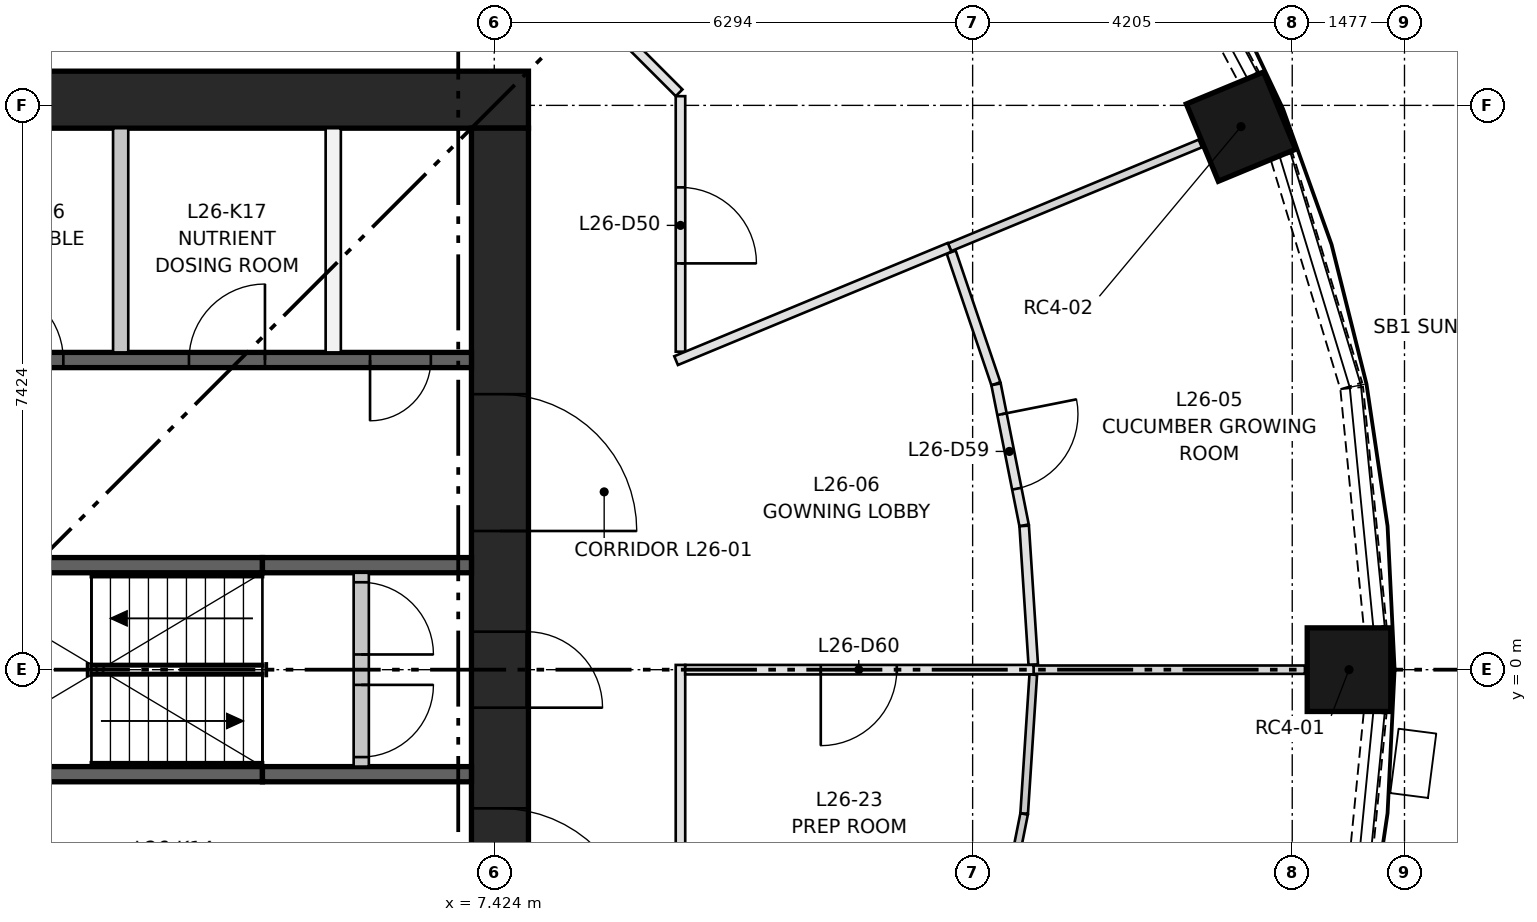
"""IFC4 building model, lengths in metres.
Left out: names, types, materials, properties, quantities, classifications, styles, units other than length and angle.
Written with IfcOpenShell. Run it as: python <this file> out.ifc"""

import sys

from ifc_helpers import new_model, si_unit, direction, frame, frame_2d, origin, origin_2d, place, context, subcontext, project, spatial, rectangle, extrude, element, fill, save


model = new_model("IFC4")
c1 = context("Model", 3, precision=1e-05, world=origin(), true_north=direction((0.0, 1.0)))
c2 = subcontext(c1, "Body", "Model", "MODEL_VIEW")
j1 = project(units=[si_unit("LENGTHUNIT", "METRE"), si_unit("PLANEANGLEUNIT", "RADIAN")], contexts=[c1])
p1 = place(None, origin())
s1 = spatial("IfcSite", under=j1, at=p1, CompositionType="ELEMENT")
p2 = place(p1, origin())
s2 = spatial("IfcBuilding", under=s1, at=p2, CompositionType="ELEMENT")
p3 = place(p2, frame((0.0, 0.0, 101.95)))
s3 = spatial("IfcBuildingStorey", under=s2, at=p3, CompositionType="ELEMENT", Elevation=101.95)
for number, where, z_axis, x_axis in (
    (1, (18.67, 0.0, 0.0), (0.0, 0.0, 1.0), (1.0, 0.0, 0.0)),
    (2, (17.249, 7.145, 0.0), (0.0, 0.0, 1.0), (0.924, 0.383, 0.0)),
):
    element("IfcColumn", number, at=place(p3, frame(where, z_axis=z_axis, x_axis=x_axis)), inside=s3, PredefinedType="COLUMN", context=c2, shape_type="SweptSolid", body=[
        extrude(rectangle(XDim=1.1, YDim=1.1, at=origin_2d()), origin(), (0.0, 0.0, 1.0), 3.65),
    ])
p4 = place(p3, frame((-7.874, 7.499, 0.0), z_axis=(0.0, 0.0, 1.0), x_axis=(1.0, 0.0, 0.0)))
e3 = element("IfcWall", 3, at=p4, inside=s3, PredefinedType="SHEAR", context=c2, shape_type="SweptSolid", body=[
    extrude(rectangle(XDim=15.748, YDim=0.75, at=frame_2d((7.874, 0.0))), origin(), (0.0, 0.0, 1.0), 3.65),
])
p5 = place(p3, frame((7.499, -7.124, 0.0), z_axis=(0.0, 0.0, 1.0), x_axis=(0.0, 1.0, 0.0)))
e4 = element("IfcWall", 4, at=p5, inside=s3, PredefinedType="SHEAR", context=c2, shape_type="SweptSolid", body=[
    extrude(rectangle(XDim=14.248, YDim=0.75, at=frame_2d((7.124, 0.0))), origin(), (0.0, 0.0, 1.0), 3.65),
])
p6 = place(p5, frame((6.624, 0.0, 0.0)))
e5 = element("IfcOpeningElement", 5, at=p6, cuts=e4, PredefinedType="OPENING", context=c2, shape_type="SweptSolid", body=[
    extrude(rectangle(XDim=1.0, YDim=2.1, at=frame_2d((0.5, 1.05))), frame((0.0, 0.385, 0.0), z_axis=(0.0, -1.0, 0.0), x_axis=(1.0, 0.0, 0.0)), (0.0, 0.0, 1.0), 0.77),
])
p7 = place(p5, frame((3.5, 0.0, 0.0)))
e6 = element("IfcOpeningElement", 6, at=p7, cuts=e4, PredefinedType="OPENING", context=c2, shape_type="SweptSolid", body=[
    extrude(rectangle(XDim=1.8, YDim=2.1, at=frame_2d((0.9, 1.05))), frame((0.0, 0.385, 0.0), z_axis=(0.0, -1.0, 0.0), x_axis=(1.0, 0.0, 0.0)), (0.0, 0.0, 1.0), 0.77),
])
p8 = place(p5, frame((8.948, 0.0, 0.0)))
e7 = element("IfcOpeningElement", 7, at=p8, cuts=e4, PredefinedType="OPENING", context=c2, shape_type="SweptSolid", body=[
    extrude(rectangle(XDim=1.8, YDim=2.1, at=frame_2d((0.9, 1.05))), frame((0.0, 0.385, 0.0), z_axis=(0.0, -1.0, 0.0), x_axis=(1.0, 0.0, 0.0)), (0.0, 0.0, 1.0), 0.77),
])
p9 = place(p3, frame((0.0, 4.074, 0.0), z_axis=(0.0, 0.0, 1.0), x_axis=(1.0, 0.0, 0.0)))
e8 = element("IfcWall", 8, at=p9, inside=s3, PredefinedType="SHEAR", context=c2, shape_type="SweptSolid", body=[
    extrude(rectangle(XDim=7.124, YDim=0.2, at=frame_2d((3.562, 0.0))), origin(), (0.0, 0.0, 1.0), 3.3),
])
p10 = place(p9, frame((0.754, 0.0, 0.0)))
e9 = element("IfcOpeningElement", 9, at=p10, cuts=e8, PredefinedType="OPENING", context=c2, shape_type="SweptSolid", body=[
    extrude(rectangle(XDim=1.0, YDim=2.1, at=frame_2d((0.5, 1.05))), frame((0.0, 0.11, 0.0), z_axis=(0.0, -1.0, 0.0), x_axis=(1.0, 0.0, 0.0)), (0.0, 0.0, 1.0), 0.22),
])
p11 = place(p9, frame((3.407, 0.0, 0.0)))
e10 = element("IfcOpeningElement", 10, at=p11, cuts=e8, PredefinedType="OPENING", context=c2, shape_type="SweptSolid", body=[
    extrude(rectangle(XDim=1.0, YDim=2.1, at=frame_2d((0.5, 1.05))), frame((0.0, 0.11, 0.0), z_axis=(0.0, -1.0, 0.0), x_axis=(1.0, 0.0, 0.0)), (0.0, 0.0, 1.0), 0.22),
])
p12 = place(p9, frame((5.79, 0.0, 0.0)))
e11 = element("IfcOpeningElement", 11, at=p12, cuts=e8, PredefinedType="OPENING", context=c2, shape_type="SweptSolid", body=[
    extrude(rectangle(XDim=0.8, YDim=2.1, at=frame_2d((0.4, 1.05))), frame((0.0, 0.11, 0.0), z_axis=(0.0, -1.0, 0.0), x_axis=(1.0, 0.0, 0.0)), (0.0, 0.0, 1.0), 0.22),
])
p13 = place(p3, frame((0.0, -1.375, 0.0), z_axis=(0.0, 0.0, 1.0), x_axis=(1.0, 0.0, 0.0)))
e12 = element("IfcWall", 12, at=p13, inside=s3, PredefinedType="SHEAR", context=c2, shape_type="SweptSolid", body=[
    extrude(rectangle(XDim=4.374, YDim=0.2, at=frame_2d((2.187, 0.0))), origin(), (0.0, 0.0, 1.0), 3.3),
])
p14 = place(p3, frame((4.374, -1.375, 0.0), z_axis=(0.0, 0.0, 1.0), x_axis=(1.0, 0.0, 0.0)))
e13 = element("IfcWall", 13, at=p14, inside=s3, PredefinedType="SHEAR", context=c2, shape_type="SweptSolid", body=[
    extrude(rectangle(XDim=2.75, YDim=0.2, at=frame_2d((1.375, 0.0))), origin(), (0.0, 0.0, 1.0), 3.3),
])
p15 = place(p3, frame((0.0, 1.375, 0.0), z_axis=(0.0, 0.0, 1.0), x_axis=(1.0, 0.0, 0.0)))
e14 = element("IfcWall", 14, at=p15, inside=s3, PredefinedType="SHEAR", context=c2, shape_type="SweptSolid", body=[
    extrude(rectangle(XDim=4.374, YDim=0.2, at=frame_2d((2.187, 0.0))), origin(), (0.0, 0.0, 1.0), 3.3),
])
p16 = place(p3, frame((4.374, 1.375, 0.0), z_axis=(0.0, 0.0, 1.0), x_axis=(1.0, 0.0, 0.0)))
e15 = element("IfcWall", 15, at=p16, inside=s3, PredefinedType="SHEAR", context=c2, shape_type="SweptSolid", body=[
    extrude(rectangle(XDim=2.75, YDim=0.2, at=frame_2d((1.375, 0.0))), origin(), (0.0, 0.0, 1.0), 3.3),
])
for number, where, z_axis, x_axis in (
    (16, (2.509, 4.174, 0.0), (0.0, 0.0, 1.0), (0.0, 1.0, 0.0)),
    (17, (5.305, 4.174, 0.0), (0.0, 0.0, 1.0), (0.0, 1.0, 0.0)),
):
    element("IfcWall", number, at=place(p3, frame(where, z_axis=z_axis, x_axis=x_axis)), inside=s3, PredefinedType="PARTITIONING", context=c2, shape_type="SweptSolid", body=[
        extrude(rectangle(XDim=2.95, YDim=0.2, at=frame_2d((1.475, 0.0))), origin(), (0.0, 0.0, 1.0), 3.3),
    ])
p17 = place(p3, frame((5.674, -1.275, 0.0), z_axis=(0.0, 0.0, 1.0), x_axis=(0.0, 1.0, 0.0)))
e18 = element("IfcWall", 18, at=p17, inside=s3, PredefinedType="PARTITIONING", context=c2, shape_type="SweptSolid", body=[
    extrude(rectangle(XDim=2.55, YDim=0.2, at=frame_2d((1.275, 0.0))), origin(), (0.0, 0.0, 1.0), 3.3),
])
p18 = place(p17, frame((0.125, 0.0, 0.0)))
e19 = element("IfcOpeningElement", 19, at=p18, cuts=e18, PredefinedType="OPENING", context=c2, shape_type="SweptSolid", body=[
    extrude(rectangle(XDim=0.95, YDim=2.1, at=frame_2d((0.475, 1.05))), frame((0.0, 0.11, 0.0), z_axis=(0.0, -1.0, 0.0), x_axis=(1.0, 0.0, 0.0)), (0.0, 0.0, 1.0), 0.22),
])
p19 = place(p17, frame((1.475, 0.0, 0.0)))
e20 = element("IfcOpeningElement", 20, at=p19, cuts=e18, PredefinedType="OPENING", context=c2, shape_type="SweptSolid", body=[
    extrude(rectangle(XDim=0.95, YDim=2.1, at=frame_2d((0.475, 1.05))), frame((0.0, 0.11, 0.0), z_axis=(0.0, -1.0, 0.0), x_axis=(1.0, 0.0, 0.0)), (0.0, 0.0, 1.0), 0.22),
])
p20 = place(p3, frame((19.014, 0.564, 0.0), z_axis=(0.0, 0.0, 1.0), x_axis=(-0.097849336863, 0.995201239587, 0.0)))
e21 = element("IfcWall", 21, at=p20, inside=s3, PredefinedType="SOLIDWALL", context=c2, shape_type="SweptSolid", body=[
    extrude(rectangle(XDim=3.156, YDim=0.3, at=frame_2d((1.578, 0.0))), origin(), (0.0, 0.0, 1.0), 0.9),
])
p21 = place(p3, frame((18.7, 3.734, 0.0), z_axis=(0.0, 0.0, 1.0), x_axis=(-0.290503096001, 0.956874051907, 0.0)))
e22 = element("IfcWall", 22, at=p21, inside=s3, PredefinedType="SOLIDWALL", context=c2, shape_type="SweptSolid", body=[
    extrude(rectangle(XDim=3.157, YDim=0.3, at=frame_2d((1.579, 0.0))), origin(), (0.0, 0.0, 1.0), 0.9),
])
p22 = place(p3, frame((17.351, 7.797, 0.0), z_axis=(0.0, 0.0, 1.0), x_axis=(-0.471238306932, 0.882005928597, 0.0)))
e23 = element("IfcWall", 23, at=p22, inside=s3, PredefinedType="SOLIDWALL", context=c2, shape_type="SweptSolid", body=[
    extrude(rectangle(XDim=3.157, YDim=0.3, at=frame_2d((1.579, 0.0))), origin(), (0.0, 0.0, 1.0), 0.9),
])
p23 = place(p3, frame((18.706, -3.705, 0.0), z_axis=(0.0, 0.0, 1.0), x_axis=(0.097849336863, 0.995201239587, 0.0)))
e24 = element("IfcWall", 24, at=p23, inside=s3, PredefinedType="SOLIDWALL", context=c2, shape_type="SweptSolid", body=[
    extrude(rectangle(XDim=3.156, YDim=0.3, at=frame_2d((1.578, 0.0))), origin(), (0.0, 0.0, 1.0), 0.9),
])
p24 = place(p3, frame((8.722, 8.722, 0.0), z_axis=(0.0, 0.0, 1.0), x_axis=(0.70718294931, -0.707030604857, 0.0)))
e25 = element("IfcWall", 25, at=p24, inside=s3, PredefinedType="PARTITIONING", context=c2, shape_type="SweptSolid", body=[
    extrude(rectangle(XDim=1.603, YDim=0.125, at=frame_2d((0.801, 0.0))), origin(), (0.0, 0.0, 1.0), 3.3),
])
p25 = place(p3, frame((9.874, 7.545, 0.0), z_axis=(0.0, 0.0, 1.0), x_axis=(0.0, -1.0, 0.0)))
e26 = element("IfcWall", 26, at=p25, inside=s3, PredefinedType="PARTITIONING", context=c2, shape_type="SweptSolid", body=[
    extrude(rectangle(XDim=3.362, YDim=0.125, at=frame_2d((1.681, 0.0))), origin(), (0.0, 0.0, 1.0), 3.3),
])
p26 = place(p25, frame((1.2, 0.0, 0.0)))
e27 = element("IfcOpeningElement", 27, at=p26, cuts=e26, PredefinedType="OPENING", context=c2, shape_type="SweptSolid", body=[
    extrude(rectangle(XDim=1.0, YDim=2.1, at=frame_2d((0.5, 1.05))), frame((0.0, 0.073, 0.0), z_axis=(0.0, -1.0, 0.0), x_axis=(1.0, 0.0, 0.0)), (0.0, 0.0, 1.0), 0.145),
])
p27 = place(p3, frame((9.874, 0.062, 0.0), z_axis=(0.0, 0.0, 1.0), x_axis=(0.0, -1.0, 0.0)))
e28 = element("IfcWall", 28, at=p27, inside=s3, PredefinedType="PARTITIONING", context=c2, shape_type="SweptSolid", body=[
    extrude(rectangle(XDim=4.152, YDim=0.125, at=frame_2d((2.076, 0.0))), origin(), (0.0, 0.0, 1.0), 3.3),
])
p28 = place(p3, frame((14.024, 3.762, 0.0), z_axis=(0.0, 0.0, 1.0), x_axis=(-0.321390424162, 0.946946775303, 0.0)))
e29 = element("IfcWall", 29, at=p28, inside=s3, PredefinedType="PARTITIONING", context=c2, shape_type="SweptSolid", body=[
    extrude(rectangle(XDim=1.828, YDim=0.125, at=frame_2d((0.914, 0.0))), origin(), (0.0, 0.0, 1.0), 3.3),
])
p29 = place(p3, frame((14.026, 3.754, 0.0), z_axis=(0.0, 0.0, 1.0), x_axis=(0.195172749159, -0.980768881024, 0.0)))
e30 = element("IfcWall", 30, at=p29, inside=s3, PredefinedType="PARTITIONING", context=c2, shape_type="SweptSolid", body=[
    extrude(rectangle(XDim=1.891, YDim=0.125, at=frame_2d((0.946, 0.0))), origin(), (0.0, 0.0, 1.0), 3.3),
])
p30 = place(p29, frame((0.4, 0.0, 0.0)))
e31 = element("IfcOpeningElement", 31, at=p30, cuts=e30, PredefinedType="OPENING", context=c2, shape_type="SweptSolid", body=[
    extrude(rectangle(XDim=1.0, YDim=2.1, at=frame_2d((0.5, 1.05))), frame((0.0, 0.073, 0.0), z_axis=(0.0, -1.0, 0.0), x_axis=(1.0, 0.0, 0.0)), (0.0, 0.0, 1.0), 0.145),
])
p31 = place(p3, frame((14.516, 0.067, 0.0), z_axis=(0.0, 0.0, 1.0), x_axis=(-0.065428883326, 0.997857234892, 0.0)))
e32 = element("IfcWall", 32, at=p31, inside=s3, PredefinedType="PARTITIONING", context=c2, shape_type="SweptSolid", body=[
    extrude(rectangle(XDim=1.828, YDim=0.125, at=frame_2d((0.914, 0.0))), origin(), (0.0, 0.0, 1.0), 3.3),
])
p32 = place(p3, frame((13.415, 5.556, 0.0), z_axis=(0.0, 0.0, 1.0), x_axis=(0.923870126847, 0.382706138858, 0.0)))
e33 = element("IfcWall", 33, at=p32, inside=s3, PredefinedType="PARTITIONING", context=c2, shape_type="SweptSolid", body=[
    extrude(rectangle(XDim=3.57, YDim=0.11, at=frame_2d((1.785, 0.0))), origin(), (0.0, 0.0, 1.0), 3.3),
])
p33 = place(p3, frame((18.09, 0.0, 0.0), z_axis=(0.0, 0.0, 1.0), x_axis=(-1.0, 0.0, 0.0)))
e34 = element("IfcWall", 34, at=p33, inside=s3, PredefinedType="PARTITIONING", context=c2, shape_type="SweptSolid", body=[
    extrude(rectangle(XDim=3.57, YDim=0.11, at=frame_2d((1.785, 0.0))), origin(), (0.0, 0.0, 1.0), 3.3),
])
p34 = place(p3, frame((9.816, 4.066, 0.0), z_axis=(0.0, 0.0, 1.0), x_axis=(0.923881608957, 0.382678419342, 0.0)))
e35 = element("IfcWall", 35, at=p34, inside=s3, PredefinedType="PARTITIONING", context=c2, shape_type="SweptSolid", body=[
    extrude(rectangle(XDim=3.895, YDim=0.125, at=frame_2d((1.947, 0.0))), origin(), (0.0, 0.0, 1.0), 3.3),
])
p35 = place(p3, frame((14.52, 0.0, 0.0), z_axis=(0.0, 0.0, 1.0), x_axis=(-1.0, 0.0, 0.0)))
e36 = element("IfcWall", 36, at=p35, inside=s3, PredefinedType="PARTITIONING", context=c2, shape_type="SweptSolid", body=[
    extrude(rectangle(XDim=4.583, YDim=0.125, at=frame_2d((2.292, 0.0))), origin(), (0.0, 0.0, 1.0), 3.3),
])
p36 = place(p35, frame((1.8, 0.0, 0.0)))
e37 = element("IfcOpeningElement", 37, at=p36, cuts=e36, PredefinedType="OPENING", context=c2, shape_type="SweptSolid", body=[
    extrude(rectangle(XDim=1.0, YDim=2.1, at=frame_2d((0.5, 1.05))), frame((0.0, 0.073, 0.0), z_axis=(0.0, -1.0, 0.0), x_axis=(1.0, 0.0, 0.0)), (0.0, 0.0, 1.0), 0.145),
])
p37 = place(p3, frame((14.395, -1.898, 0.0), z_axis=(0.0, 0.0, 1.0), x_axis=(-0.195148680089, -0.980773670456, 0.0)))
e38 = element("IfcWall", 38, at=p37, inside=s3, PredefinedType="PARTITIONING", context=c2, shape_type="SweptSolid", body=[
    extrude(rectangle(XDim=1.893, YDim=0.1, at=frame_2d((0.946, 0.0))), origin(), (0.0, 0.0, 1.0), 3.3),
])
p38 = place(p37, frame((0.4, 0.0, 0.0)))
e39 = element("IfcOpeningElement", 39, at=p38, cuts=e38, PredefinedType="OPENING", context=c2, shape_type="SweptSolid", body=[
    extrude(rectangle(XDim=1.0, YDim=2.1, at=frame_2d((0.5, 1.05))), frame((0.0, 0.06, 0.0), z_axis=(0.0, -1.0, 0.0), x_axis=(1.0, 0.0, 0.0)), (0.0, 0.0, 1.0), 0.12),
])
p39 = place(p3, frame((14.516, -0.066, 0.0), z_axis=(0.0, 0.0, 1.0), x_axis=(-0.065376617685, -0.997860660543, 0.0)))
e40 = element("IfcWall", 40, at=p39, inside=s3, PredefinedType="PARTITIONING", context=c2, shape_type="SweptSolid", body=[
    extrude(rectangle(XDim=1.83, YDim=0.1, at=frame_2d((0.915, 0.0))), origin(), (0.0, 0.0, 1.0), 3.3),
])
p40 = place(p18, frame((0.95, 0.0, 0.0), z_axis=(0.0, 0.0, 1.0), x_axis=(-1.0, 0.0, 0.0)))
e41 = element("IfcDoor", 41, at=p40, inside=s3, OperationType="SINGLE_SWING_RIGHT", PredefinedType="DOOR", context=c2, shape_type="SweptSolid", body=[
    extrude(rectangle(XDim=0.95, YDim=2.1, at=frame_2d((0.475, 1.05))), frame((0.0, 0.025, 0.0), z_axis=(0.0, -1.0, 0.0), x_axis=(1.0, 0.0, 0.0)), (0.0, 0.0, 1.0), 0.05),
])
fill(e19, e41)
p41 = place(p19, frame((0.95, 0.0, 0.0), z_axis=(0.0, 0.0, 1.0), x_axis=(-1.0, 0.0, 0.0)))
e42 = element("IfcDoor", 42, at=p41, inside=s3, OperationType="SINGLE_SWING_LEFT", PredefinedType="DOOR", context=c2, shape_type="SweptSolid", body=[
    extrude(rectangle(XDim=0.95, YDim=2.1, at=frame_2d((0.475, 1.05))), frame((0.0, 0.025, 0.0), z_axis=(0.0, -1.0, 0.0), x_axis=(1.0, 0.0, 0.0)), (0.0, 0.0, 1.0), 0.05),
])
fill(e20, e42)
p42 = place(p10, origin())
e43 = element("IfcDoor", 43, at=p42, inside=s3, OperationType="SINGLE_SWING_LEFT", PredefinedType="DOOR", context=c2, shape_type="SweptSolid", body=[
    extrude(rectangle(XDim=1.0, YDim=2.1, at=frame_2d((0.5, 1.05))), frame((0.0, 0.025, 0.0), z_axis=(0.0, -1.0, 0.0), x_axis=(1.0, 0.0, 0.0)), (0.0, 0.0, 1.0), 0.05),
])
fill(e9, e43)
p43 = place(p11, origin())
e44 = element("IfcDoor", 44, at=p43, inside=s3, OperationType="SINGLE_SWING_RIGHT", PredefinedType="DOOR", context=c2, shape_type="SweptSolid", body=[
    extrude(rectangle(XDim=1.0, YDim=2.1, at=frame_2d((0.5, 1.05))), frame((0.0, 0.025, 0.0), z_axis=(0.0, -1.0, 0.0), x_axis=(1.0, 0.0, 0.0)), (0.0, 0.0, 1.0), 0.05),
])
fill(e10, e44)
p44 = place(p12, frame((0.8, 0.0, 0.0), z_axis=(0.0, 0.0, 1.0), x_axis=(-1.0, 0.0, 0.0)))
e45 = element("IfcDoor", 45, at=p44, inside=s3, OperationType="SINGLE_SWING_LEFT", PredefinedType="DOOR", context=c2, shape_type="SweptSolid", body=[
    extrude(rectangle(XDim=0.8, YDim=2.1, at=frame_2d((0.4, 1.05))), frame((0.0, 0.025, 0.0), z_axis=(0.0, -1.0, 0.0), x_axis=(1.0, 0.0, 0.0)), (0.0, 0.0, 1.0), 0.05),
])
fill(e11, e45)
p45 = place(p6, frame((1.0, 0.0, 0.0), z_axis=(0.0, 0.0, 1.0), x_axis=(-1.0, 0.0, 0.0)))
e46 = element("IfcDoor", 46, at=p45, inside=s3, OperationType="SINGLE_SWING_LEFT", PredefinedType="DOOR", context=c2, shape_type="SweptSolid", body=[
    extrude(rectangle(XDim=1.0, YDim=2.1, at=frame_2d((0.5, 1.05))), frame((0.0, 0.375, 0.0), z_axis=(0.0, -1.0, 0.0), x_axis=(1.0, 0.0, 0.0)), (0.0, 0.0, 1.0), 0.05),
])
fill(e5, e46)
p46 = place(p7, frame((1.8, 0.0, 0.0), z_axis=(0.0, 0.0, 1.0), x_axis=(-1.0, 0.0, 0.0)))
e47 = element("IfcDoor", 47, at=p46, inside=s3, OperationType="DOUBLE_DOOR_SINGLE_SWING", PredefinedType="DOOR", context=c2, shape_type="SweptSolid", body=[
    extrude(rectangle(XDim=1.8, YDim=2.1, at=frame_2d((0.9, 1.05))), frame((0.0, 0.025, 0.0), z_axis=(0.0, -1.0, 0.0), x_axis=(1.0, 0.0, 0.0)), (0.0, 0.0, 1.0), 0.05),
])
fill(e6, e47)
p47 = place(p8, frame((1.8, 0.0, 0.0), z_axis=(0.0, 0.0, 1.0), x_axis=(-1.0, 0.0, 0.0)))
e48 = element("IfcDoor", 48, at=p47, inside=s3, OperationType="DOUBLE_DOOR_SINGLE_SWING", PredefinedType="DOOR", context=c2, shape_type="SweptSolid", body=[
    extrude(rectangle(XDim=1.8, YDim=2.1, at=frame_2d((0.9, 1.05))), frame((0.0, 0.025, 0.0), z_axis=(0.0, -1.0, 0.0), x_axis=(1.0, 0.0, 0.0)), (0.0, 0.0, 1.0), 0.05),
])
fill(e7, e48)
p48 = place(p26, origin())
e49 = element("IfcDoor", 49, at=p48, inside=s3, OperationType="SINGLE_SWING_RIGHT", PredefinedType="DOOR", context=c2, shape_type="SweptSolid", body=[
    extrude(rectangle(XDim=1.0, YDim=2.1, at=frame_2d((0.5, 1.05))), frame((0.0, 0.025, 0.0), z_axis=(0.0, -1.0, 0.0), x_axis=(1.0, 0.0, 0.0)), (0.0, 0.0, 1.0), 0.05),
])
fill(e27, e49)
p49 = place(p30, origin())
e50 = element("IfcDoor", 50, at=p49, inside=s3, OperationType="SINGLE_SWING_LEFT", PredefinedType="DOOR", context=c2, shape_type="SweptSolid", body=[
    extrude(rectangle(XDim=1.0, YDim=2.1, at=frame_2d((0.5, 1.05))), frame((0.0, 0.025, 0.0), z_axis=(0.0, -1.0, 0.0), x_axis=(1.0, 0.0, 0.0)), (0.0, 0.0, 1.0), 0.05),
])
fill(e31, e50)
p50 = place(p36, origin())
e51 = element("IfcDoor", 51, at=p50, inside=s3, OperationType="SINGLE_SWING_RIGHT", PredefinedType="DOOR", context=c2, shape_type="SweptSolid", body=[
    extrude(rectangle(XDim=1.0, YDim=2.1, at=frame_2d((0.5, 1.05))), frame((0.0, 0.025, 0.0), z_axis=(0.0, -1.0, 0.0), x_axis=(1.0, 0.0, 0.0)), (0.0, 0.0, 1.0), 0.05),
])
fill(e37, e51)
save(model, sys.argv[1])
